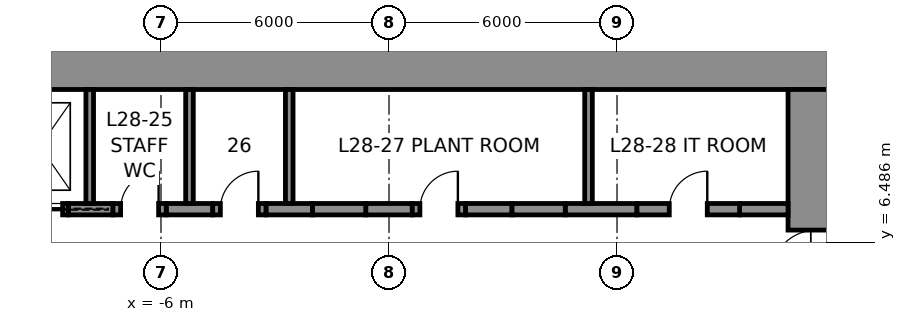
"""IFC4 building model, lengths in metres.
Left out: names, types, materials, properties, quantities, classifications, styles, units other than length and angle.
Written with IfcOpenShell. Run it as: python <this file> out.ifc"""

import sys

from ifc_helpers import new_model, si_unit, direction, frame, frame_2d, origin, place, context, subcontext, project, spatial, rectangle, extrude, element, fill, save


model = new_model("IFC4")
c1 = context("Model", 3, precision=1e-05, world=origin(), true_north=direction((0.0, 1.0)))
c2 = subcontext(c1, "Body", "Model", "MODEL_VIEW")
j1 = project(units=[si_unit("LENGTHUNIT", "METRE"), si_unit("PLANEANGLEUNIT", "RADIAN")], contexts=[c1])
p1 = place(None, origin())
s1 = spatial("IfcSite", under=j1, at=p1, CompositionType="ELEMENT")
p2 = place(p1, origin())
s2 = spatial("IfcBuilding", under=s1, at=p2, CompositionType="ELEMENT")
p3 = place(p2, frame((0.0, 0.0, 139.8)))
s3 = spatial("IfcBuildingStorey", under=s2, at=p3, CompositionType="ELEMENT", Elevation=139.8)
p4 = place(p3, frame((-12.0, 11.25, 0.0), z_axis=(0.0, 0.0, 1.0), x_axis=(1.0, 0.0, 0.0)))
e1 = element("IfcWall", 1, at=p4, inside=s3, PredefinedType="SHEAR", context=c2, shape_type="SweptSolid", body=[
    extrude(rectangle(XDim=24.0, YDim=1.5, at=frame_2d((12.0, 0.0))), origin(), (0.0, 0.0, 1.0), 4.0),
])
p5 = place(p3, frame((11.25, 10.5, 0.0), z_axis=(0.0, 0.0, 1.0), x_axis=(0.0, -1.0, 0.0)))
e2 = element("IfcWall", 2, at=p5, inside=s3, PredefinedType="SHEAR", context=c2, shape_type="SweptSolid", body=[
    extrude(rectangle(XDim=21.0, YDim=1.5, at=frame_2d((10.5, 0.0))), origin(), (0.0, 0.0, 1.0), 4.0),
])
p6 = place(p5, frame((3.7, 0.0, 0.0)))
e3 = element("IfcOpeningElement", 3, at=p6, cuts=e2, PredefinedType="OPENING", context=c2, shape_type="SweptSolid", body=[
    extrude(rectangle(XDim=1.2, YDim=2.3, at=frame_2d((0.6, 1.15))), frame((0.0, 0.76, 0.0), z_axis=(0.0, -1.0, 0.0), x_axis=(1.0, 0.0, 0.0)), (0.0, 0.0, 1.0), 1.52),
])
p7 = place(p5, frame((16.1, 0.0, 0.0)))
e4 = element("IfcOpeningElement", 4, at=p7, cuts=e2, PredefinedType="OPENING", context=c2, shape_type="SweptSolid", body=[
    extrude(rectangle(XDim=1.2, YDim=2.3, at=frame_2d((0.6, 1.15))), frame((0.0, 0.76, 0.0), z_axis=(0.0, -1.0, 0.0), x_axis=(1.0, 0.0, 0.0)), (0.0, 0.0, 1.0), 1.52),
])
p8 = place(p3, frame((-8.438, 7.35, 0.0), z_axis=(0.0, 0.0, 1.0), x_axis=(1.0, 0.0, 0.0)))
e5 = element("IfcWall", 5, at=p8, inside=s3, PredefinedType="SHEAR", context=c2, shape_type="SweptSolid", body=[
    extrude(rectangle(XDim=1.175, YDim=0.3, at=frame_2d((0.587, 0.0))), origin(), (0.0, 0.0, 1.0), 4.0),
])
for number, where, z_axis, x_axis in (
    (6, (-5.863, 7.35, 0.0), (0.0, 0.0, 1.0), (1.0, 0.0, 0.0)),
    (7, (-3.238, 7.35, 0.0), (0.0, 0.0, 1.0), (1.0, 0.0, 0.0)),
    (8, (-0.613, 7.35, 0.0), (0.0, 0.0, 1.0), (1.0, 0.0, 0.0)),
    (9, (2.012, 7.35, 0.0), (0.0, 0.0, 1.0), (1.0, 0.0, 0.0)),
):
    element("IfcWall", number, at=place(p3, frame(where, z_axis=z_axis, x_axis=x_axis)), inside=s3, PredefinedType="SHEAR", context=c2, shape_type="SweptSolid", body=[
        extrude(rectangle(XDim=1.225, YDim=0.3, at=frame_2d((0.613, 0.0))), origin(), (0.0, 0.0, 1.0), 4.0),
    ])
p9 = place(p3, frame((4.637, 7.35, 0.0), z_axis=(0.0, 0.0, 1.0), x_axis=(1.0, 0.0, 0.0)))
e10 = element("IfcWall", 10, at=p9, inside=s3, PredefinedType="SHEAR", context=c2, shape_type="SweptSolid", body=[
    extrude(rectangle(XDim=1.887, YDim=0.3, at=frame_2d((0.944, 0.0))), origin(), (0.0, 0.0, 1.0), 4.0),
])
p10 = place(p3, frame((9.225, 7.35, 0.0), z_axis=(0.0, 0.0, 1.0), x_axis=(1.0, 0.0, 0.0)))
e11 = element("IfcWall", 11, at=p10, inside=s3, PredefinedType="SHEAR", context=c2, shape_type="SweptSolid", body=[
    extrude(rectangle(XDim=1.275, YDim=0.3, at=frame_2d((0.637, 0.0))), origin(), (0.0, 0.0, 1.0), 4.0),
])
p11 = place(p3, frame((-9.938, 7.35, 0.0), z_axis=(0.0, 0.0, 1.0), x_axis=(1.0, 0.0, 0.0)))
e12 = element("IfcWall", 12, at=p11, inside=s3, PredefinedType="PARTITIONING", context=c2, shape_type="SweptSolid", body=[
    extrude(rectangle(XDim=1.5, YDim=0.3, at=frame_2d((0.75, 0.0))), origin(), (0.0, 0.0, 1.0), 4.0),
])
p12 = place(p11, frame((0.15, 0.0, 0.0)))
e13 = element("IfcOpeningElement", 13, at=p12, cuts=e12, PredefinedType="OPENING", context=c2, shape_type="SweptSolid", body=[
    extrude(rectangle(XDim=1.2, YDim=2.3, at=frame_2d((0.6, 1.15))), frame((0.0, 0.16, 0.0), z_axis=(0.0, -1.0, 0.0), x_axis=(1.0, 0.0, 0.0)), (0.0, 0.0, 1.0), 0.32),
])
p13 = place(p3, frame((-7.262, 7.35, 0.0), z_axis=(0.0, 0.0, 1.0), x_axis=(1.0, 0.0, 0.0)))
e14 = element("IfcWall", 14, at=p13, inside=s3, PredefinedType="PARTITIONING", context=c2, shape_type="SweptSolid", body=[
    extrude(rectangle(XDim=1.4, YDim=0.3, at=frame_2d((0.7, 0.0))), origin(), (0.0, 0.0, 1.0), 4.0),
])
p14 = place(p13, frame((0.2, 0.0, 0.0)))
e15 = element("IfcOpeningElement", 15, at=p14, cuts=e14, PredefinedType="OPENING", context=c2, shape_type="SweptSolid", body=[
    extrude(rectangle(XDim=1.0, YDim=2.3, at=frame_2d((0.5, 1.15))), frame((0.0, 0.16, 0.0), z_axis=(0.0, -1.0, 0.0), x_axis=(1.0, 0.0, 0.0)), (0.0, 0.0, 1.0), 0.32),
])
p15 = place(p3, frame((-4.637, 7.35, 0.0), z_axis=(0.0, 0.0, 1.0), x_axis=(1.0, 0.0, 0.0)))
e16 = element("IfcWall", 16, at=p15, inside=s3, PredefinedType="PARTITIONING", context=c2, shape_type="SweptSolid", body=[
    extrude(rectangle(XDim=1.4, YDim=0.3, at=frame_2d((0.7, 0.0))), origin(), (0.0, 0.0, 1.0), 4.0),
])
p16 = place(p15, frame((0.2, 0.0, 0.0)))
e17 = element("IfcOpeningElement", 17, at=p16, cuts=e16, PredefinedType="OPENING", context=c2, shape_type="SweptSolid", body=[
    extrude(rectangle(XDim=1.0, YDim=2.3, at=frame_2d((0.5, 1.15))), frame((0.0, 0.16, 0.0), z_axis=(0.0, -1.0, 0.0), x_axis=(1.0, 0.0, 0.0)), (0.0, 0.0, 1.0), 0.32),
])
p17 = place(p3, frame((-2.012, 7.35, 0.0), z_axis=(0.0, 0.0, 1.0), x_axis=(1.0, 0.0, 0.0)))
e18 = element("IfcWall", 18, at=p17, inside=s3, PredefinedType="PARTITIONING", context=c2, shape_type="SweptSolid", body=[
    extrude(rectangle(XDim=1.4, YDim=0.3, at=frame_2d((0.7, 0.0))), origin(), (0.0, 0.0, 1.0), 4.0),
])
p18 = place(p3, frame((0.613, 7.35, 0.0), z_axis=(0.0, 0.0, 1.0), x_axis=(1.0, 0.0, 0.0)))
e19 = element("IfcWall", 19, at=p18, inside=s3, PredefinedType="PARTITIONING", context=c2, shape_type="SweptSolid", body=[
    extrude(rectangle(XDim=1.4, YDim=0.3, at=frame_2d((0.7, 0.0))), origin(), (0.0, 0.0, 1.0), 4.0),
])
p19 = place(p18, frame((0.2, 0.0, 0.0)))
e20 = element("IfcOpeningElement", 20, at=p19, cuts=e19, PredefinedType="OPENING", context=c2, shape_type="SweptSolid", body=[
    extrude(rectangle(XDim=1.0, YDim=2.3, at=frame_2d((0.5, 1.15))), frame((0.0, 0.16, 0.0), z_axis=(0.0, -1.0, 0.0), x_axis=(1.0, 0.0, 0.0)), (0.0, 0.0, 1.0), 0.32),
])
p20 = place(p3, frame((3.238, 7.35, 0.0), z_axis=(0.0, 0.0, 1.0), x_axis=(1.0, 0.0, 0.0)))
e21 = element("IfcWall", 21, at=p20, inside=s3, PredefinedType="PARTITIONING", context=c2, shape_type="SweptSolid", body=[
    extrude(rectangle(XDim=1.4, YDim=0.3, at=frame_2d((0.7, 0.0))), origin(), (0.0, 0.0, 1.0), 4.0),
])
p21 = place(p3, frame((6.525, 7.35, 0.0), z_axis=(0.0, 0.0, 1.0), x_axis=(1.0, 0.0, 0.0)))
e22 = element("IfcWall", 22, at=p21, inside=s3, PredefinedType="PARTITIONING", context=c2, shape_type="SweptSolid", body=[
    extrude(rectangle(XDim=2.7, YDim=0.3, at=frame_2d((1.35, 0.0))), origin(), (0.0, 0.0, 1.0), 4.0),
])
p22 = place(p21, frame((0.85, 0.0, 0.0)))
e23 = element("IfcOpeningElement", 23, at=p22, cuts=e22, PredefinedType="OPENING", context=c2, shape_type="SweptSolid", body=[
    extrude(rectangle(XDim=1.0, YDim=2.3, at=frame_2d((0.5, 1.15))), frame((0.0, 0.16, 0.0), z_axis=(0.0, -1.0, 0.0), x_axis=(1.0, 0.0, 0.0)), (0.0, 0.0, 1.0), 0.32),
])
for number, where, z_axis, x_axis in (
    (24, (-7.875, 7.5, 0.0), (0.0, 0.0, 1.0), (0.0, 1.0, 0.0)),
    (25, (-5.25, 7.5, 0.0), (0.0, 0.0, 1.0), (0.0, 1.0, 0.0)),
    (26, (-2.625, 7.5, 0.0), (0.0, 0.0, 1.0), (0.0, 1.0, 0.0)),
    (27, (5.25, 7.5, 0.0), (0.0, 0.0, 1.0), (0.0, 1.0, 0.0)),
):
    element("IfcWall", number, at=place(p3, frame(where, z_axis=z_axis, x_axis=x_axis)), inside=s3, PredefinedType="PARTITIONING", context=c2, shape_type="SweptSolid", body=[
        extrude(rectangle(XDim=3.0, YDim=0.2, at=frame_2d((1.5, 0.0))), origin(), (0.0, 0.0, 1.0), 4.0),
    ])
p23 = place(p14, origin())
e28 = element("IfcDoor", 28, at=p23, inside=s3, OperationType="SINGLE_SWING_RIGHT", PredefinedType="DOOR", context=c2, shape_type="SweptSolid", body=[
    extrude(rectangle(XDim=1.0, YDim=2.3, at=frame_2d((0.5, 1.15))), frame((0.0, 0.025, 0.0), z_axis=(0.0, -1.0, 0.0), x_axis=(1.0, 0.0, 0.0)), (0.0, 0.0, 1.0), 0.05),
])
fill(e15, e28)
p24 = place(p16, origin())
e29 = element("IfcDoor", 29, at=p24, inside=s3, OperationType="SINGLE_SWING_RIGHT", PredefinedType="DOOR", context=c2, shape_type="SweptSolid", body=[
    extrude(rectangle(XDim=1.0, YDim=2.3, at=frame_2d((0.5, 1.15))), frame((0.0, 0.025, 0.0), z_axis=(0.0, -1.0, 0.0), x_axis=(1.0, 0.0, 0.0)), (0.0, 0.0, 1.0), 0.05),
])
fill(e17, e29)
p25 = place(p19, origin())
e30 = element("IfcDoor", 30, at=p25, inside=s3, OperationType="SINGLE_SWING_RIGHT", PredefinedType="DOOR", context=c2, shape_type="SweptSolid", body=[
    extrude(rectangle(XDim=1.0, YDim=2.3, at=frame_2d((0.5, 1.15))), frame((0.0, 0.025, 0.0), z_axis=(0.0, -1.0, 0.0), x_axis=(1.0, 0.0, 0.0)), (0.0, 0.0, 1.0), 0.05),
])
fill(e20, e30)
p26 = place(p22, origin())
e31 = element("IfcDoor", 31, at=p26, inside=s3, OperationType="SINGLE_SWING_RIGHT", PredefinedType="DOOR", context=c2, shape_type="SweptSolid", body=[
    extrude(rectangle(XDim=1.0, YDim=2.3, at=frame_2d((0.5, 1.15))), frame((0.0, 0.025, 0.0), z_axis=(0.0, -1.0, 0.0), x_axis=(1.0, 0.0, 0.0)), (0.0, 0.0, 1.0), 0.05),
])
fill(e23, e31)
p27 = place(p6, frame((1.2, 0.0, 0.0), z_axis=(0.0, 0.0, 1.0), x_axis=(-1.0, 0.0, 0.0)))
e32 = element("IfcDoor", 32, at=p27, inside=s3, OperationType="SINGLE_SWING_LEFT", PredefinedType="DOOR", context=c2, shape_type="SweptSolid", body=[
    extrude(rectangle(XDim=1.2, YDim=2.3, at=frame_2d((0.6, 1.15))), frame((0.0, 0.025, 0.0), z_axis=(0.0, -1.0, 0.0), x_axis=(1.0, 0.0, 0.0)), (0.0, 0.0, 1.0), 0.05),
])
fill(e3, e32)
p28 = place(p12, frame((1.2, 0.0, 0.0), z_axis=(0.0, 0.0, 1.0), x_axis=(-1.0, 0.0, 0.0)))
e33 = element("IfcDoor", 33, at=p28, inside=s3, OperationType="SLIDING_TO_LEFT", PredefinedType="DOOR", context=c2, shape_type="SweptSolid", body=[
    extrude(rectangle(XDim=1.2, YDim=2.3, at=frame_2d((0.6, 1.15))), frame((0.0, 0.025, 0.0), z_axis=(0.0, -1.0, 0.0), x_axis=(1.0, 0.0, 0.0)), (0.0, 0.0, 1.0), 0.05),
])
fill(e13, e33)
save(model, sys.argv[1])
